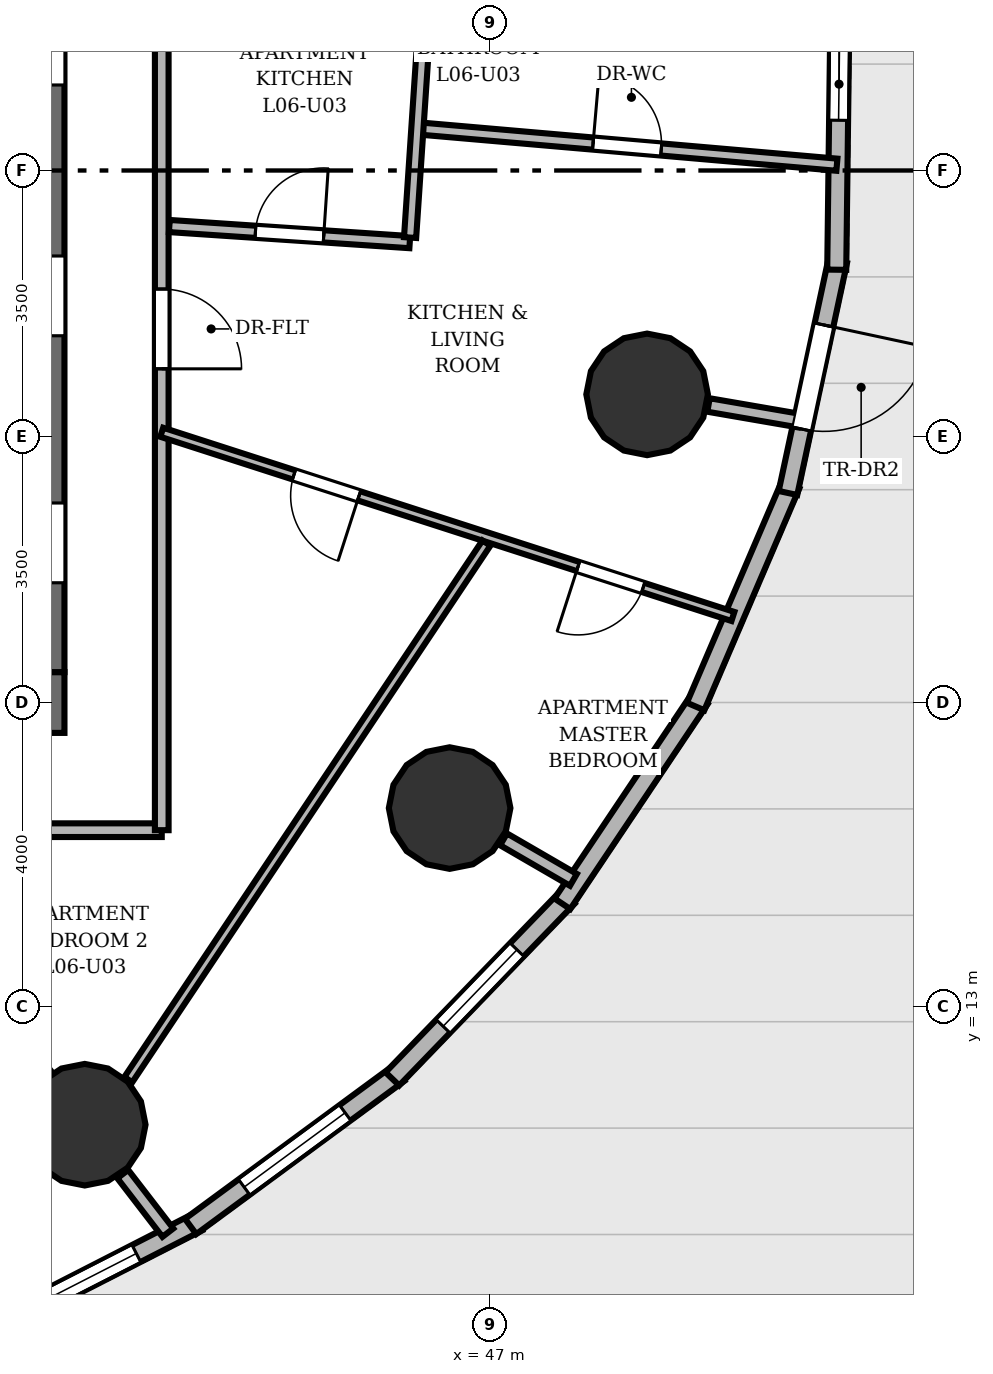
"""IFC4 building model, lengths in metres.
Left out: names, types, materials, properties, quantities, classifications, styles, units other than length and angle.
Written with IfcOpenShell. Run it as: python <this file> out.ifc"""

import sys

from ifc_helpers import new_model, si_unit, direction, frame, frame_2d, origin, origin_2d, place, context, subcontext, project, spatial, rectangle, circle, extrude, element, fill, save


model = new_model("IFC4")
c1 = context("Model", 3, precision=1e-05, world=origin(), true_north=direction((0.0, 1.0)))
c2 = subcontext(c1, "Body", "Model", "MODEL_VIEW")
j1 = project(units=[si_unit("LENGTHUNIT", "METRE"), si_unit("PLANEANGLEUNIT", "RADIAN")], contexts=[c1])
p1 = place(None, origin())
s1 = spatial("IfcSite", under=j1, at=p1, CompositionType="ELEMENT")
p2 = place(p1, origin())
s2 = spatial("IfcBuilding", under=s1, at=p2, CompositionType="ELEMENT")
p3 = place(p2, frame((0.0, 0.0, 24.8)))
s3 = spatial("IfcBuildingStorey", under=s2, at=p3, CompositionType="ELEMENT", Elevation=24.8)
p4 = place(p3, frame((22.6, 17.0, 0.0), z_axis=(0.0, 0.0, 1.0), x_axis=(1.0, 0.0, 0.0)))
e1 = element("IfcWall", 1, at=p4, inside=s3, PredefinedType="SHEAR", context=c2, shape_type="SweptSolid", body=[
    extrude(rectangle(XDim=18.8, YDim=0.8, at=frame_2d((9.4, 0.0))), origin(), (0.0, 0.0, 1.0), 3.2),
])
p5 = place(p4, frame((5.9, 0.0, 0.0)))
e2 = element("IfcOpeningElement", 2, at=p5, cuts=e1, PredefinedType="OPENING", context=c2, shape_type="SweptSolid", body=[
    extrude(rectangle(XDim=1.1, YDim=2.15, at=frame_2d((0.55, 1.075))), frame((0.0, 0.41, 0.0), z_axis=(0.0, -1.0, 0.0), x_axis=(1.0, 0.0, 0.0)), (0.0, 0.0, 1.0), 0.82),
])
p6 = place(p4, frame((9.45, 0.0, 0.0)))
e3 = element("IfcOpeningElement", 3, at=p6, cuts=e1, PredefinedType="OPENING", context=c2, shape_type="SweptSolid", body=[
    extrude(rectangle(XDim=0.9, YDim=2.1, at=frame_2d((0.45, 1.05))), frame((0.0, 0.41, 0.0), z_axis=(0.0, -1.0, 0.0), x_axis=(1.0, 0.0, 0.0)), (0.0, 0.0, 1.0), 0.82),
])
p7 = place(p3, frame((41.0, 17.4, 0.0), z_axis=(0.0, 0.0, 1.0), x_axis=(0.0, 1.0, 0.0)))
e4 = element("IfcWall", 4, at=p7, inside=s3, PredefinedType="SHEAR", context=c2, shape_type="SweptSolid", body=[
    extrude(rectangle(XDim=13.2, YDim=0.8, at=frame_2d((6.6, 0.0))), origin(), (0.0, 0.0, 1.0), 3.2),
])
p8 = place(p7, frame((1.175, 0.0, 0.0)))
e5 = element("IfcOpeningElement", 5, at=p8, cuts=e4, PredefinedType="OPENING", context=c2, shape_type="SweptSolid", body=[
    extrude(rectangle(XDim=1.05, YDim=2.15, at=frame_2d((0.525, 1.075))), frame((0.0, 0.41, 0.0), z_axis=(0.0, -1.0, 0.0), x_axis=(1.0, 0.0, 0.0)), (0.0, 0.0, 1.0), 0.82),
])
p9 = place(p7, frame((4.425, 0.0, 0.0)))
e6 = element("IfcOpeningElement", 6, at=p9, cuts=e4, PredefinedType="OPENING", context=c2, shape_type="SweptSolid", body=[
    extrude(rectangle(XDim=1.05, YDim=2.15, at=frame_2d((0.525, 1.075))), frame((0.0, 0.41, 0.0), z_axis=(0.0, -1.0, 0.0), x_axis=(1.0, 0.0, 0.0)), (0.0, 0.0, 1.0), 0.82),
])
p10 = place(p7, frame((7.725, 0.0, 0.0)))
e7 = element("IfcOpeningElement", 7, at=p10, cuts=e4, PredefinedType="OPENING", context=c2, shape_type="SweptSolid", body=[
    extrude(rectangle(XDim=1.05, YDim=2.15, at=frame_2d((0.525, 1.075))), frame((0.0, 0.41, 0.0), z_axis=(0.0, -1.0, 0.0), x_axis=(1.0, 0.0, 0.0)), (0.0, 0.0, 1.0), 0.82),
])
p11 = place(p7, frame((10.975, 0.0, 0.0)))
e8 = element("IfcOpeningElement", 8, at=p11, cuts=e4, PredefinedType="OPENING", context=c2, shape_type="SweptSolid", body=[
    extrude(rectangle(XDim=1.05, YDim=2.15, at=frame_2d((0.525, 1.075))), frame((0.0, 0.41, 0.0), z_axis=(0.0, -1.0, 0.0), x_axis=(1.0, 0.0, 0.0)), (0.0, 0.0, 1.0), 0.82),
])
for number, where, z_axis, x_axis in (
    (9, (41.667, 11.445, 0.0), (0.0, 0.0, 1.0), (1.0, 0.0, 0.0)),
    (10, (46.468, 15.611, 0.0), (0.0, 0.0, 1.0), (1.0, 0.0, 0.0)),
    (11, (49.066, 21.054, 0.0), (0.0, 0.0, 1.0), (1.0, 0.0, 0.0)),
):
    element("IfcColumn", number, at=place(p3, frame(where, z_axis=z_axis, x_axis=x_axis)), inside=s3, PredefinedType="COLUMN", context=c2, shape_type="SweptSolid", body=[
        extrude(circle(Radius=0.8, at=origin_2d()), origin(), (0.0, 0.0, 1.0), 3.2),
    ])
p12 = place(p3, frame((43.153, 10.164, 0.0), z_axis=(0.0, 0.0, 1.0), x_axis=(-0.890260122421, -0.455452428281, 0.0)))
e12 = element("IfcWall", 12, at=p12, inside=s3, PredefinedType="SOLIDWALL", context=c2, shape_type="SweptSolid", body=[
    extrude(rectangle(XDim=3.465, YDim=0.25, at=frame_2d((1.732, 0.0))), origin(), (0.0, 0.0, 1.0), 2.96),
])
p13 = place(p12, frame((0.907, 0.0, 0.85)))
e13 = element("IfcOpeningElement", 13, at=p13, cuts=e12, PredefinedType="OPENING", context=c2, shape_type="SweptSolid", body=[
    extrude(rectangle(XDim=1.65, YDim=1.55, at=frame_2d((0.825, 0.775))), frame((0.0, 0.135, 0.0), z_axis=(0.0, -1.0, 0.0), x_axis=(1.0, 0.0, 0.0)), (0.0, 0.0, 1.0), 0.27),
])
p14 = place(p3, frame((45.798, 12.12, 0.0), z_axis=(0.0, 0.0, 1.0), x_axis=(-0.805405938507, -0.592723606935, 0.0)))
e14 = element("IfcWall", 14, at=p14, inside=s3, PredefinedType="SOLIDWALL", context=c2, shape_type="SweptSolid", body=[
    extrude(rectangle(XDim=3.399, YDim=0.25, at=frame_2d((1.699, 0.0))), origin(), (0.0, 0.0, 1.0), 2.96),
])
p15 = place(p14, frame((0.875, 0.0, 0.85)))
e15 = element("IfcOpeningElement", 15, at=p15, cuts=e14, PredefinedType="OPENING", context=c2, shape_type="SweptSolid", body=[
    extrude(rectangle(XDim=1.65, YDim=1.55, at=frame_2d((0.825, 0.775))), frame((0.0, 0.135, 0.0), z_axis=(0.0, -1.0, 0.0), x_axis=(1.0, 0.0, 0.0)), (0.0, 0.0, 1.0), 0.27),
])
p16 = place(p3, frame((48.021, 14.438, 0.0), z_axis=(0.0, 0.0, 1.0), x_axis=(-0.694392538781, -0.719596416115, 0.0)))
e16 = element("IfcWall", 16, at=p16, inside=s3, PredefinedType="SOLIDWALL", context=c2, shape_type="SweptSolid", body=[
    extrude(rectangle(XDim=3.323, YDim=0.25, at=frame_2d((1.661, 0.0))), origin(), (0.0, 0.0, 1.0), 2.96),
])
p17 = place(p16, frame((0.961, 0.0, 0.85)))
e17 = element("IfcOpeningElement", 17, at=p17, cuts=e16, PredefinedType="OPENING", context=c2, shape_type="SweptSolid", body=[
    extrude(rectangle(XDim=1.4, YDim=1.55, at=frame_2d((0.7, 0.775))), frame((0.0, 0.135, 0.0), z_axis=(0.0, -1.0, 0.0), x_axis=(1.0, 0.0, 0.0)), (0.0, 0.0, 1.0), 0.27),
])
p18 = place(p3, frame((49.758, 17.047, 0.0), z_axis=(0.0, 0.0, 1.0), x_axis=(-0.556764929833, -0.83067009872, 0.0)))
e18 = element("IfcWall", 18, at=p18, inside=s3, PredefinedType="SOLIDWALL", context=c2, shape_type="SweptSolid", body=[
    extrude(rectangle(XDim=3.244, YDim=0.25, at=frame_2d((1.622, 0.0))), origin(), (0.0, 0.0, 1.0), 2.96),
])
p19 = place(p3, frame((50.954, 19.865, 0.0), z_axis=(0.0, 0.0, 1.0), x_axis=(-0.393733630937, -0.91922457967, 0.0)))
e19 = element("IfcWall", 19, at=p19, inside=s3, PredefinedType="SOLIDWALL", context=c2, shape_type="SweptSolid", body=[
    extrude(rectangle(XDim=3.174, YDim=0.25, at=frame_2d((1.587, 0.0))), origin(), (0.0, 0.0, 1.0), 2.96),
])
p20 = place(p3, frame((51.573, 22.808, 0.0), z_axis=(0.0, 0.0, 1.0), x_axis=(-0.209668000253, -0.977772637002, 0.0)))
e20 = element("IfcWall", 20, at=p20, inside=s3, PredefinedType="SOLIDWALL", context=c2, shape_type="SweptSolid", body=[
    extrude(rectangle(XDim=3.121, YDim=0.25, at=frame_2d((1.56, 0.0))), origin(), (0.0, 0.0, 1.0), 2.96),
])
p21 = place(p20, frame((0.86, 0.0, 0.0)))
e21 = element("IfcOpeningElement", 21, at=p21, cuts=e20, PredefinedType="OPENING", context=c2, shape_type="SweptSolid", body=[
    extrude(rectangle(XDim=1.4, YDim=2.01, at=frame_2d((0.7, 1.005))), frame((0.0, 0.135, 0.0), z_axis=(0.0, -1.0, 0.0), x_axis=(1.0, 0.0, 0.0)), (0.0, 0.0, 1.0), 0.27),
])
p22 = place(p3, frame((51.599, 25.786, 0.0), z_axis=(0.0, 0.0, 1.0), x_axis=(-0.012397373015, -0.999923149618, 0.0)))
e22 = element("IfcWall", 22, at=p22, inside=s3, PredefinedType="SOLIDWALL", context=c2, shape_type="SweptSolid", body=[
    extrude(rectangle(XDim=3.092, YDim=0.25, at=frame_2d((1.546, 0.0))), origin(), (0.0, 0.0, 1.0), 2.96),
])
p23 = place(p22, frame((0.175, 0.0, 0.85)))
e23 = element("IfcOpeningElement", 23, at=p23, cuts=e22, PredefinedType="OPENING", context=c2, shape_type="SweptSolid", body=[
    extrude(rectangle(XDim=0.95, YDim=1.45, at=frame_2d((0.475, 0.725))), frame((0.0, 0.135, 0.0), z_axis=(0.0, -1.0, 0.0), x_axis=(1.0, 0.0, 0.0)), (0.0, 0.0, 1.0), 0.27),
])
p24 = place(p3, frame((42.167, 10.795, 0.0), z_axis=(0.0, 0.0, 1.0), x_axis=(0.609953343804, -0.792437327732, 0.0)))
e24 = element("IfcWall", 24, at=p24, inside=s3, PredefinedType="PARTITIONING", context=c2, shape_type="SweptSolid", body=[
    extrude(rectangle(XDim=0.973, YDim=0.18, at=frame_2d((0.486, 0.0))), origin(), (0.0, 0.0, 1.0), 2.178),
])
p25 = place(p3, frame((47.177, 15.2, 0.0), z_axis=(0.0, 0.0, 1.0), x_axis=(0.865001274409, -0.501769663562, 0.0)))
e25 = element("IfcWall", 25, at=p25, inside=s3, PredefinedType="PARTITIONING", context=c2, shape_type="SweptSolid", body=[
    extrude(rectangle(XDim=1.063, YDim=0.18, at=frame_2d((0.531, 0.0))), origin(), (0.0, 0.0, 1.0), 2.178),
])
p26 = place(p3, frame((49.874, 20.915, 0.0), z_axis=(0.0, 0.0, 1.0), x_axis=(0.985412344637, -0.170183756676, 0.0)))
e26 = element("IfcWall", 26, at=p26, inside=s3, PredefinedType="PARTITIONING", context=c2, shape_type="SweptSolid", body=[
    extrude(rectangle(XDim=1.211, YDim=0.18, at=frame_2d((0.605, 0.0))), origin(), (0.0, 0.0, 1.0), 2.178),
])
p27 = place(p3, frame((42.68, 15.32, 0.0), z_axis=(0.0, 0.0, 1.0), x_axis=(-1.0, 0.0, 0.0)))
e27 = element("IfcWall", 27, at=p27, inside=s3, PredefinedType="PARTITIONING", context=c2, shape_type="SweptSolid", body=[
    extrude(rectangle(XDim=8.823, YDim=0.18, at=frame_2d((4.411, 0.0))), origin(), (0.0, 0.0, 1.0), 2.955),
])
p28 = place(p27, frame((6.462, 0.0, 0.0)))
e28 = element("IfcOpeningElement", 28, at=p28, cuts=e27, PredefinedType="OPENING", context=c2, shape_type="SweptSolid", body=[
    extrude(rectangle(XDim=1.05, YDim=2.15, at=frame_2d((0.525, 1.075))), frame((0.0, 0.1, 0.0), z_axis=(0.0, -1.0, 0.0), x_axis=(1.0, 0.0, 0.0)), (0.0, 0.0, 1.0), 0.2),
])
p29 = place(p3, frame((42.68, 32.68, 0.0), z_axis=(0.0, 0.0, 1.0), x_axis=(0.0, -1.0, 0.0)))
e29 = element("IfcWall", 29, at=p29, inside=s3, PredefinedType="PARTITIONING", context=c2, shape_type="SweptSolid", body=[
    extrude(rectangle(XDim=17.36, YDim=0.18, at=frame_2d((8.68, 0.0))), origin(), (0.0, 0.0, 1.0), 2.955),
])
p30 = place(p29, frame((10.24, 0.0, 0.0)))
e30 = element("IfcOpeningElement", 30, at=p30, cuts=e29, PredefinedType="OPENING", context=c2, shape_type="SweptSolid", body=[
    extrude(rectangle(XDim=1.05, YDim=2.15, at=frame_2d((0.525, 1.075))), frame((0.0, 0.1, 0.0), z_axis=(0.0, -1.0, 0.0), x_axis=(1.0, 0.0, 0.0)), (0.0, 0.0, 1.0), 0.2),
])
p31 = place(p3, frame((38.744, 15.241, 0.0), z_axis=(0.0, 0.0, 1.0), x_axis=(0.610097434882, -0.792326397358, 0.0)))
e31 = element("IfcWall", 31, at=p31, inside=s3, PredefinedType="PLUMBINGWALL", context=c2, shape_type="SweptSolid", body=[
    extrude(rectangle(XDim=3.997, YDim=0.16, at=frame_2d((1.998, 0.0))), origin(), (0.0, 0.0, 1.0), 2.178),
])
p32 = place(p3, frame((46.044, 24.555, 0.0), z_axis=(0.0, 0.0, 1.0), x_axis=(0.996262385211, -0.086378584226, 0.0)))
e32 = element("IfcWall", 32, at=p32, inside=s3, PredefinedType="PLUMBINGWALL", context=c2, shape_type="SweptSolid", body=[
    extrude(rectangle(XDim=5.54, YDim=0.16, at=frame_2d((2.77, 0.0))), origin(), (0.0, 0.0, 1.0), 2.641),
])
p33 = place(p32, frame((2.32, 0.0, 0.0)))
e33 = element("IfcOpeningElement", 33, at=p33, cuts=e32, PredefinedType="OPENING", context=c2, shape_type="SweptSolid", body=[
    extrude(rectangle(XDim=0.9, YDim=2.1, at=frame_2d((0.45, 1.05))), frame((0.0, 0.09, 0.0), z_axis=(0.0, -1.0, 0.0), x_axis=(1.0, 0.0, 0.0)), (0.0, 0.0, 1.0), 0.18),
])
p34 = place(p3, frame((50.195, 18.132, 0.0), z_axis=(0.0, 0.0, 1.0), x_axis=(-0.951723769721, 0.306955804879, 0.0)))
e34 = element("IfcWall", 34, at=p34, inside=s3, PredefinedType="PARTITIONING", context=c2, shape_type="SweptSolid", body=[
    extrude(rectangle(XDim=7.896, YDim=0.125, at=frame_2d((3.948, 0.0))), origin(), (0.0, 0.0, 1.0), 2.955),
])
p35 = place(p34, frame((1.241, 0.0, 0.0)))
e35 = element("IfcOpeningElement", 35, at=p35, cuts=e34, PredefinedType="OPENING", context=c2, shape_type="SweptSolid", body=[
    extrude(rectangle(XDim=0.9, YDim=2.1, at=frame_2d((0.45, 1.05))), frame((0.0, 0.073, 0.0), z_axis=(0.0, -1.0, 0.0), x_axis=(1.0, 0.0, 0.0)), (0.0, 0.0, 1.0), 0.145),
])
p36 = place(p34, frame((5.169, 0.0, 0.0)))
e36 = element("IfcOpeningElement", 36, at=p36, cuts=e34, PredefinedType="OPENING", context=c2, shape_type="SweptSolid", body=[
    extrude(rectangle(XDim=0.9, YDim=2.1, at=frame_2d((0.45, 1.05))), frame((0.0, 0.073, 0.0), z_axis=(0.0, -1.0, 0.0), x_axis=(1.0, 0.0, 0.0)), (0.0, 0.0, 1.0), 0.145),
])
p37 = place(p3, frame((42.78, 23.269, 0.0), z_axis=(0.0, 0.0, 1.0), x_axis=(0.99776911562, -0.066759208461, 0.0)))
e37 = element("IfcWall", 37, at=p37, inside=s3, PredefinedType="PLUMBINGWALL", context=c2, shape_type="SweptSolid", body=[
    extrude(rectangle(XDim=3.171, YDim=0.16, at=frame_2d((1.585, 0.0))), origin(), (0.0, 0.0, 1.0), 2.641),
])
p38 = place(p37, frame((1.135, 0.0, 0.0)))
e38 = element("IfcOpeningElement", 38, at=p38, cuts=e37, PredefinedType="OPENING", context=c2, shape_type="SweptSolid", body=[
    extrude(rectangle(XDim=0.9, YDim=2.1, at=frame_2d((0.45, 1.05))), frame((0.0, 0.09, 0.0), z_axis=(0.0, -1.0, 0.0), x_axis=(1.0, 0.0, 0.0)), (0.0, 0.0, 1.0), 0.18),
])
p39 = place(p3, frame((45.947, 23.117, 0.0), z_axis=(0.0, 0.0, 1.0), x_axis=(0.066888153037, 0.997760479766, 0.0)))
e39 = element("IfcWall", 39, at=p39, inside=s3, PredefinedType="PLUMBINGWALL", context=c2, shape_type="SweptSolid", body=[
    extrude(rectangle(XDim=3.336, YDim=0.16, at=frame_2d((1.668, 0.0))), origin(), (0.0, 0.0, 1.0), 2.955),
])
p40 = place(p3, frame((42.24, 12.037, 0.0), z_axis=(0.0, 0.0, 1.0), x_axis=(0.55508513016, 0.831793543059, 0.0)))
e40 = element("IfcWall", 40, at=p40, inside=s3, PredefinedType="PARTITIONING", context=c2, shape_type="SweptSolid", body=[
    extrude(rectangle(XDim=8.488, YDim=0.125, at=frame_2d((4.244, 0.0))), origin(), (0.0, 0.0, 1.0), 2.328),
])
p41 = place(p21, origin())
e41 = element("IfcDoor", 41, at=p41, inside=s3, OperationType="SINGLE_SWING_LEFT", PredefinedType="DOOR", context=c2, shape_type="SweptSolid", body=[
    extrude(rectangle(XDim=1.4, YDim=2.01, at=frame_2d((0.7, 1.005))), frame((0.0, 0.025, 0.0), z_axis=(0.0, -1.0, 0.0), x_axis=(1.0, 0.0, 0.0)), (0.0, 0.0, 1.0), 0.05),
])
fill(e21, e41)
p42 = place(p13, origin())
e42 = element("IfcWindow", 42, at=p42, inside=s3, PartitioningType="SINGLE_PANEL", PredefinedType="WINDOW", context=c2, shape_type="SweptSolid", body=[
    extrude(rectangle(XDim=1.65, YDim=1.55, at=frame_2d((0.825, 0.775))), frame((0.0, 0.03, 0.0), z_axis=(0.0, -1.0, 0.0), x_axis=(1.0, 0.0, 0.0)), (0.0, 0.0, 1.0), 0.06),
])
fill(e13, e42)
p43 = place(p15, origin())
e43 = element("IfcWindow", 43, at=p43, inside=s3, PartitioningType="SINGLE_PANEL", PredefinedType="WINDOW", context=c2, shape_type="SweptSolid", body=[
    extrude(rectangle(XDim=1.65, YDim=1.55, at=frame_2d((0.825, 0.775))), frame((0.0, 0.03, 0.0), z_axis=(0.0, -1.0, 0.0), x_axis=(1.0, 0.0, 0.0)), (0.0, 0.0, 1.0), 0.06),
])
fill(e15, e43)
p44 = place(p17, origin())
e44 = element("IfcWindow", 44, at=p44, inside=s3, PartitioningType="SINGLE_PANEL", PredefinedType="WINDOW", context=c2, shape_type="SweptSolid", body=[
    extrude(rectangle(XDim=1.4, YDim=1.55, at=frame_2d((0.7, 0.775))), frame((0.0, 0.03, 0.0), z_axis=(0.0, -1.0, 0.0), x_axis=(1.0, 0.0, 0.0)), (0.0, 0.0, 1.0), 0.06),
])
fill(e17, e44)
p45 = place(p23, origin())
e45 = element("IfcWindow", 45, at=p45, inside=s3, PartitioningType="SINGLE_PANEL", PredefinedType="WINDOW", context=c2, shape_type="SweptSolid", body=[
    extrude(rectangle(XDim=0.95, YDim=1.45, at=frame_2d((0.475, 0.725))), frame((0.0, 0.03, 0.0), z_axis=(0.0, -1.0, 0.0), x_axis=(1.0, 0.0, 0.0)), (0.0, 0.0, 1.0), 0.06),
])
fill(e23, e45)
p46 = place(p30, origin())
e46 = element("IfcDoor", 46, at=p46, inside=s3, OperationType="SINGLE_SWING_RIGHT", PredefinedType="DOOR", context=c2, shape_type="SweptSolid", body=[
    extrude(rectangle(XDim=1.05, YDim=2.15, at=frame_2d((0.525, 1.075))), frame((0.0, 0.025, 0.0), z_axis=(0.0, -1.0, 0.0), x_axis=(1.0, 0.0, 0.0)), (0.0, 0.0, 1.0), 0.05),
])
fill(e30, e46)
p47 = place(p33, origin())
e47 = element("IfcDoor", 47, at=p47, inside=s3, OperationType="SINGLE_SWING_LEFT", PredefinedType="DOOR", context=c2, shape_type="SweptSolid", body=[
    extrude(rectangle(XDim=0.9, YDim=2.1, at=frame_2d((0.45, 1.05))), frame((0.0, 0.025, 0.0), z_axis=(0.0, -1.0, 0.0), x_axis=(1.0, 0.0, 0.0)), (0.0, 0.0, 1.0), 0.05),
])
fill(e33, e47)
p48 = place(p35, origin())
e48 = element("IfcDoor", 48, at=p48, inside=s3, OperationType="SINGLE_SWING_RIGHT", PredefinedType="DOOR", context=c2, shape_type="SweptSolid", body=[
    extrude(rectangle(XDim=0.9, YDim=2.1, at=frame_2d((0.45, 1.05))), frame((0.0, 0.025, 0.0), z_axis=(0.0, -1.0, 0.0), x_axis=(1.0, 0.0, 0.0)), (0.0, 0.0, 1.0), 0.05),
])
fill(e35, e48)
p49 = place(p36, origin())
e49 = element("IfcDoor", 49, at=p49, inside=s3, OperationType="SINGLE_SWING_LEFT", PredefinedType="DOOR", context=c2, shape_type="SweptSolid", body=[
    extrude(rectangle(XDim=0.9, YDim=2.1, at=frame_2d((0.45, 1.05))), frame((0.0, 0.025, 0.0), z_axis=(0.0, -1.0, 0.0), x_axis=(1.0, 0.0, 0.0)), (0.0, 0.0, 1.0), 0.05),
])
fill(e36, e49)
p50 = place(p38, origin())
e50 = element("IfcDoor", 50, at=p50, inside=s3, OperationType="SINGLE_SWING_RIGHT", PredefinedType="DOOR", context=c2, shape_type="SweptSolid", body=[
    extrude(rectangle(XDim=0.9, YDim=2.1, at=frame_2d((0.45, 1.05))), frame((0.0, 0.025, 0.0), z_axis=(0.0, -1.0, 0.0), x_axis=(1.0, 0.0, 0.0)), (0.0, 0.0, 1.0), 0.05),
])
fill(e38, e50)
save(model, sys.argv[1])
